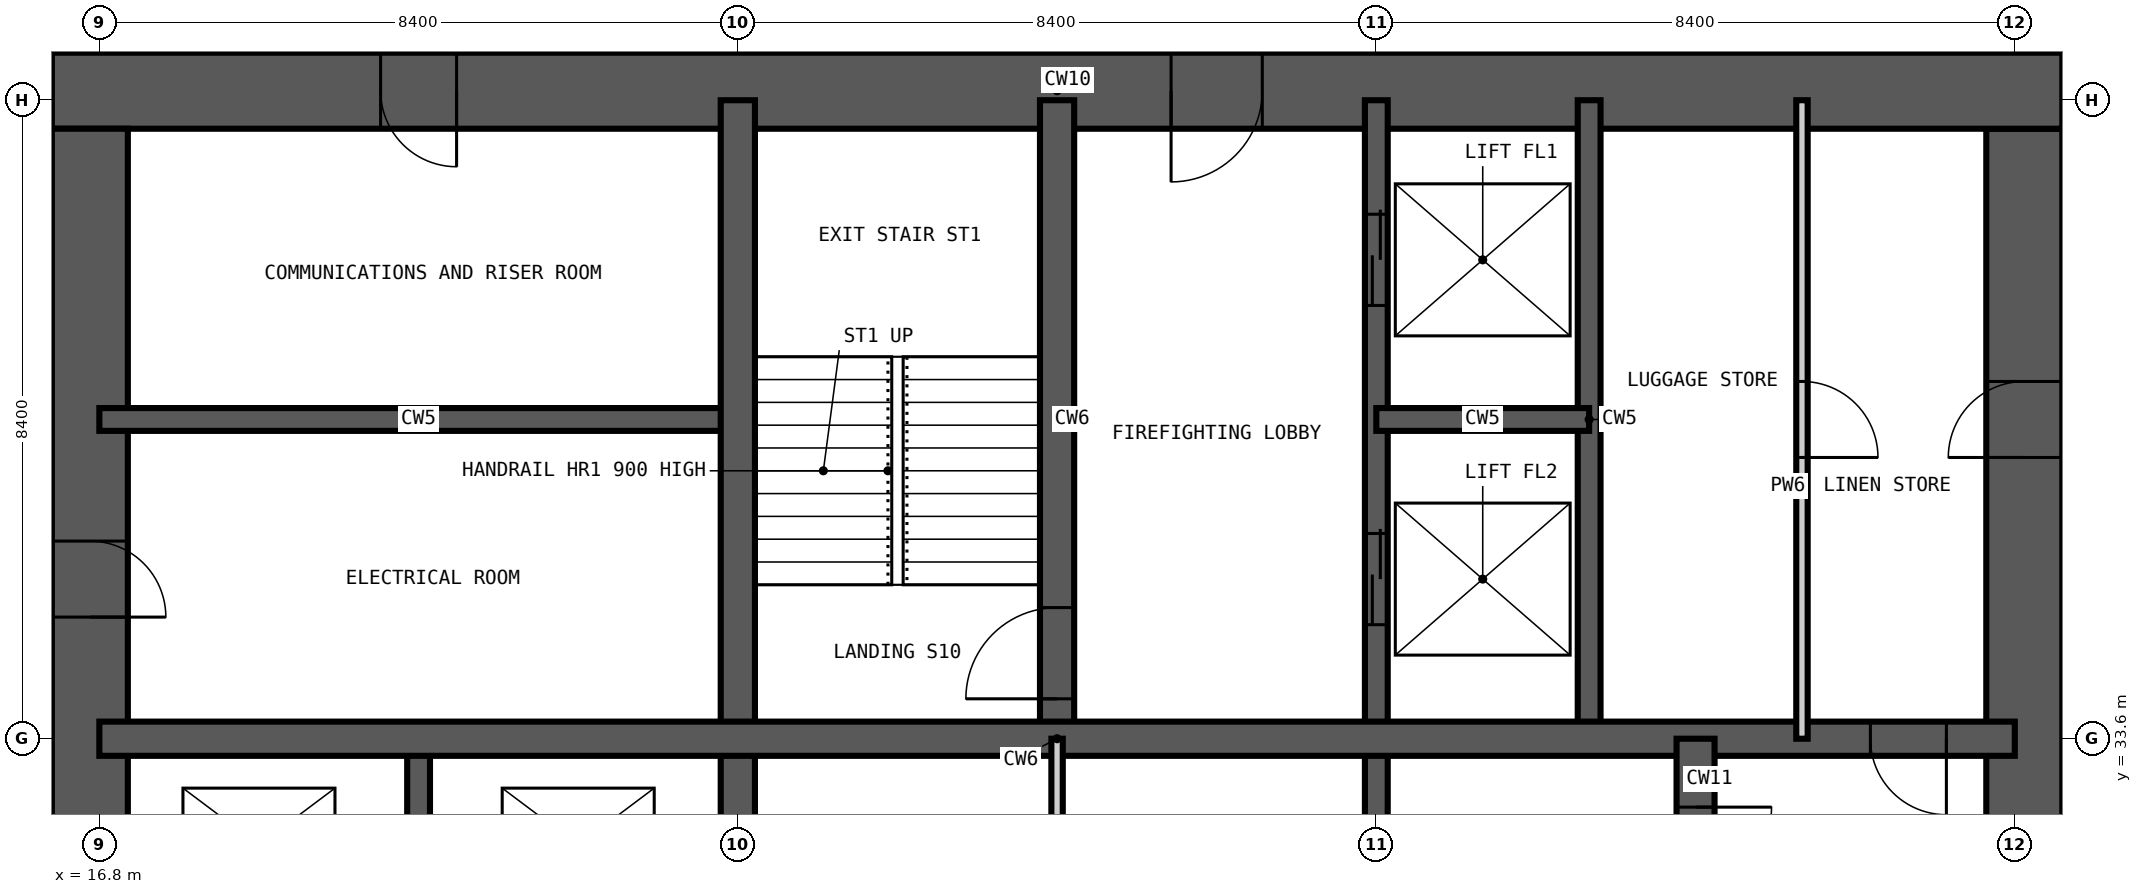
"""IFC4 building model, lengths in metres.
Left out: names, types, materials, properties, quantities, classifications, styles, units other than length and angle.
Written with IfcOpenShell. Run it as: python <this file> out.ifc"""

import sys

from ifc_helpers import new_model, si_unit, direction, frame, frame_2d, origin, place, context, subcontext, project, spatial, rectangle, extrude, element, fill, save


model = new_model("IFC4")
c1 = context("Model", 3, precision=1e-05, world=origin(), true_north=direction((0.0, 1.0)))
c2 = subcontext(c1, "Body", "Model", "MODEL_VIEW")
j1 = project(units=[si_unit("LENGTHUNIT", "METRE"), si_unit("PLANEANGLEUNIT", "RADIAN")], contexts=[c1])
p1 = place(None, origin())
s1 = spatial("IfcSite", under=j1, at=p1, CompositionType="ELEMENT")
p2 = place(p1, origin())
s2 = spatial("IfcBuilding", under=s1, at=p2, CompositionType="ELEMENT")
p3 = place(p2, frame((0.0, 0.0, 122.4)))
s3 = spatial("IfcBuildingStorey", under=s2, at=p3, CompositionType="ELEMENT", Elevation=122.4)
p4 = place(p3, frame((42.125, 17.175, -0.35), z_axis=(0.0, 0.0, 1.0), x_axis=(0.0, 1.0, 0.0)))
e1 = element("IfcWall", 1, at=p4, inside=s3, PredefinedType="SHEAR", context=c2, shape_type="SweptSolid", body=[
    extrude(rectangle(XDim=24.45, YDim=1.0, at=frame_2d((12.225, 0.0))), origin(), (0.0, 0.0, 1.0), 3.6),
])
p5 = place(p4, frame((0.425, 0.0, 0.35)))
e2 = element("IfcOpeningElement", 2, at=p5, cuts=e1, PredefinedType="OPENING", context=c2, shape_type="SweptSolid", body=[
    extrude(rectangle(XDim=1.2, YDim=2.2, at=frame_2d((0.6, 1.1))), frame((0.0, 0.51, 0.0), z_axis=(0.0, -1.0, 0.0), x_axis=(1.0, 0.0, 0.0)), (0.0, 0.0, 1.0), 1.02),
])
p6 = place(p4, frame((11.325, 0.0, 0.35)))
e3 = element("IfcOpeningElement", 3, at=p6, cuts=e1, PredefinedType="OPENING", context=c2, shape_type="SweptSolid", body=[
    extrude(rectangle(XDim=1.8, YDim=2.2, at=frame_2d((0.9, 1.1))), frame((0.0, 0.51, 0.0), z_axis=(0.0, -1.0, 0.0), x_axis=(1.0, 0.0, 0.0)), (0.0, 0.0, 1.0), 1.02),
])
p7 = place(p4, frame((20.125, 0.0, 0.35)))
e4 = element("IfcOpeningElement", 4, at=p7, cuts=e1, PredefinedType="OPENING", context=c2, shape_type="SweptSolid", body=[
    extrude(rectangle(XDim=1.0, YDim=2.1, at=frame_2d((0.5, 1.05))), frame((0.0, 0.51, 0.0), z_axis=(0.0, -1.0, 0.0), x_axis=(1.0, 0.0, 0.0)), (0.0, 0.0, 1.0), 1.02),
])
p8 = place(p3, frame((42.625, 42.125, -0.35), z_axis=(0.0, 0.0, 1.0), x_axis=(-1.0, 0.0, 0.0)))
e5 = element("IfcWall", 5, at=p8, inside=s3, PredefinedType="SHEAR", context=c2, shape_type="SweptSolid", body=[
    extrude(rectangle(XDim=26.45, YDim=1.0, at=frame_2d((13.225, 0.0))), origin(), (0.0, 0.0, 1.0), 3.6),
])
p9 = place(p8, frame((21.125, 0.0, 0.35)))
e6 = element("IfcOpeningElement", 6, at=p9, cuts=e5, PredefinedType="OPENING", context=c2, shape_type="SweptSolid", body=[
    extrude(rectangle(XDim=1.0, YDim=2.1, at=frame_2d((0.5, 1.05))), frame((0.0, 0.51, 0.0), z_axis=(0.0, -1.0, 0.0), x_axis=(1.0, 0.0, 0.0)), (0.0, 0.0, 1.0), 1.02),
])
p10 = place(p8, frame((10.525, 0.0, 0.35)))
e7 = element("IfcOpeningElement", 7, at=p10, cuts=e5, PredefinedType="OPENING", context=c2, shape_type="SweptSolid", body=[
    extrude(rectangle(XDim=1.2, YDim=2.2, at=frame_2d((0.6, 1.1))), frame((0.0, 0.51, 0.0), z_axis=(0.0, -1.0, 0.0), x_axis=(1.0, 0.0, 0.0)), (0.0, 0.0, 1.0), 1.02),
])
p11 = place(p3, frame((16.675, 41.625, -0.35), z_axis=(0.0, 0.0, 1.0), x_axis=(0.0, -1.0, 0.0)))
e8 = element("IfcWall", 8, at=p11, inside=s3, PredefinedType="SHEAR", context=c2, shape_type="SweptSolid", body=[
    extrude(rectangle(XDim=24.45, YDim=1.0, at=frame_2d((12.225, 0.0))), origin(), (0.0, 0.0, 1.0), 3.6),
])
p12 = place(p11, frame((11.325, 0.0, 0.35)))
e9 = element("IfcOpeningElement", 9, at=p12, cuts=e8, PredefinedType="OPENING", context=c2, shape_type="SweptSolid", body=[
    extrude(rectangle(XDim=1.8, YDim=2.2, at=frame_2d((0.9, 1.1))), frame((0.0, 0.51, 0.0), z_axis=(0.0, -1.0, 0.0), x_axis=(1.0, 0.0, 0.0)), (0.0, 0.0, 1.0), 1.02),
])
p13 = place(p11, frame((20.125, 0.0, 0.35)))
e10 = element("IfcOpeningElement", 10, at=p13, cuts=e8, PredefinedType="OPENING", context=c2, shape_type="SweptSolid", body=[
    extrude(rectangle(XDim=1.0, YDim=2.1, at=frame_2d((0.5, 1.05))), frame((0.0, 0.51, 0.0), z_axis=(0.0, -1.0, 0.0), x_axis=(1.0, 0.0, 0.0)), (0.0, 0.0, 1.0), 1.02),
])
p14 = place(p11, frame((5.425, 0.0, 0.35)))
e11 = element("IfcOpeningElement", 11, at=p14, cuts=e8, PredefinedType="OPENING", context=c2, shape_type="SweptSolid", body=[
    extrude(rectangle(XDim=1.0, YDim=2.1, at=frame_2d((0.5, 1.05))), frame((0.0, 0.51, 0.0), z_axis=(0.0, -1.0, 0.0), x_axis=(1.0, 0.0, 0.0)), (0.0, 0.0, 1.0), 1.02),
])
p15 = place(p3, frame((21.0, 30.8, -0.35), z_axis=(0.0, 0.0, 1.0), x_axis=(0.0, 1.0, 0.0)))
e12 = element("IfcWall", 12, at=p15, inside=s3, PredefinedType="SHEAR", context=c2, shape_type="SweptSolid", body=[
    extrude(rectangle(XDim=2.8, YDim=0.3, at=frame_2d((1.4, 0.0))), origin(), (0.0, 0.0, 1.0), 3.6),
])
p16 = place(p3, frame((33.6, 16.8, -0.35), z_axis=(0.0, 0.0, 1.0), x_axis=(0.0, 1.0, 0.0)))
e13 = element("IfcWall", 13, at=p16, inside=s3, PredefinedType="SHEAR", context=c2, shape_type="SweptSolid", body=[
    extrude(rectangle(XDim=25.2, YDim=0.3, at=frame_2d((12.6, 0.0))), origin(), (0.0, 0.0, 1.0), 3.6),
])
p17 = place(p16, frame((22.5, 0.0, 0.35)))
e14 = element("IfcOpeningElement", 14, at=p17, cuts=e13, PredefinedType="OPENING", context=c2, shape_type="SweptSolid", body=[
    extrude(rectangle(XDim=1.2, YDim=2.2, at=frame_2d((0.6, 1.1))), frame((0.0, 0.16, 0.0), z_axis=(0.0, -1.0, 0.0), x_axis=(1.0, 0.0, 0.0)), (0.0, 0.0, 1.0), 0.32),
])
p18 = place(p16, frame((18.3, 0.0, 0.35)))
e15 = element("IfcOpeningElement", 15, at=p18, cuts=e13, PredefinedType="OPENING", context=c2, shape_type="SweptSolid", body=[
    extrude(rectangle(XDim=1.2, YDim=2.2, at=frame_2d((0.6, 1.1))), frame((0.0, 0.16, 0.0), z_axis=(0.0, -1.0, 0.0), x_axis=(1.0, 0.0, 0.0)), (0.0, 0.0, 1.0), 0.32),
])
for number, where, z_axis, x_axis in (
    (16, (36.4, 33.6, -0.35), (0.0, 0.0, 1.0), (0.0, 1.0, 0.0)),
    (17, (16.8, 37.8, -0.35), (0.0, 0.0, 1.0), (1.0, 0.0, 0.0)),
):
    element("IfcWall", number, at=place(p3, frame(where, z_axis=z_axis, x_axis=x_axis)), inside=s3, PredefinedType="SHEAR", context=c2, shape_type="SweptSolid", body=[
        extrude(rectangle(XDim=8.4, YDim=0.3, at=frame_2d((4.2, 0.0))), origin(), (0.0, 0.0, 1.0), 3.6),
    ])
p19 = place(p3, frame((33.6, 37.8, -0.35), z_axis=(0.0, 0.0, 1.0), x_axis=(1.0, 0.0, 0.0)))
e18 = element("IfcWall", 18, at=p19, inside=s3, PredefinedType="SHEAR", context=c2, shape_type="SweptSolid", body=[
    extrude(rectangle(XDim=2.8, YDim=0.3, at=frame_2d((1.4, 0.0))), origin(), (0.0, 0.0, 1.0), 3.6),
])
p20 = place(p3, frame((25.2, 16.8, -0.35), z_axis=(0.0, 0.0, 1.0), x_axis=(0.0, 1.0, 0.0)))
e19 = element("IfcWall", 19, at=p20, inside=s3, PredefinedType="SHEAR", context=c2, shape_type="SweptSolid", body=[
    extrude(rectangle(XDim=25.2, YDim=0.45, at=frame_2d((12.6, 0.0))), origin(), (0.0, 0.0, 1.0), 3.6),
])
p21 = place(p20, frame((12.1, 0.0, 0.35)))
e20 = element("IfcOpeningElement", 20, at=p21, cuts=e19, PredefinedType="OPENING", context=c2, shape_type="SweptSolid", body=[
    extrude(rectangle(XDim=1.0, YDim=2.1, at=frame_2d((0.5, 1.05))), frame((0.0, 0.235, 0.0), z_axis=(0.0, -1.0, 0.0), x_axis=(1.0, 0.0, 0.0)), (0.0, 0.0, 1.0), 0.47),
])
p22 = place(p3, frame((29.4, 33.6, -0.35), z_axis=(0.0, 0.0, 1.0), x_axis=(0.0, 1.0, 0.0)))
e21 = element("IfcWall", 21, at=p22, inside=s3, PredefinedType="SHEAR", context=c2, shape_type="SweptSolid", body=[
    extrude(rectangle(XDim=8.4, YDim=0.45, at=frame_2d((4.2, 0.0))), origin(), (0.0, 0.0, 1.0), 3.6),
])
p23 = place(p22, frame((0.525, 0.0, 0.35)))
e22 = element("IfcOpeningElement", 22, at=p23, cuts=e21, PredefinedType="OPENING", context=c2, shape_type="SweptSolid", body=[
    extrude(rectangle(XDim=1.2, YDim=2.2, at=frame_2d((0.6, 1.1))), frame((0.0, 0.235, 0.0), z_axis=(0.0, -1.0, 0.0), x_axis=(1.0, 0.0, 0.0)), (0.0, 0.0, 1.0), 0.47),
])
p24 = place(p3, frame((16.8, 33.6, -0.35), z_axis=(0.0, 0.0, 1.0), x_axis=(1.0, 0.0, 0.0)))
e23 = element("IfcWall", 23, at=p24, inside=s3, PredefinedType="SHEAR", context=c2, shape_type="SweptSolid", body=[
    extrude(rectangle(XDim=25.2, YDim=0.45, at=frame_2d((12.6, 0.0))), origin(), (0.0, 0.0, 1.0), 3.6),
])
p25 = place(p24, frame((23.3, 0.0, 0.35)))
e24 = element("IfcOpeningElement", 24, at=p25, cuts=e23, PredefinedType="OPENING", context=c2, shape_type="SweptSolid", body=[
    extrude(rectangle(XDim=1.0, YDim=2.1, at=frame_2d((0.5, 1.05))), frame((0.0, 0.235, 0.0), z_axis=(0.0, -1.0, 0.0), x_axis=(1.0, 0.0, 0.0)), (0.0, 0.0, 1.0), 0.47),
])
p26 = place(p3, frame((37.8, 30.8, -0.35), z_axis=(0.0, 0.0, 1.0), x_axis=(0.0, 1.0, 0.0)))
e25 = element("IfcWall", 25, at=p26, inside=s3, PredefinedType="SHEAR", context=c2, shape_type="SweptSolid", body=[
    extrude(rectangle(XDim=2.8, YDim=0.5, at=frame_2d((1.4, 0.0))), origin(), (0.0, 0.0, 1.0), 3.6),
])
p27 = place(p26, frame((0.9, 0.0, 0.35)))
e26 = element("IfcOpeningElement", 26, at=p27, cuts=e25, PredefinedType="OPENING", context=c2, shape_type="SweptSolid", body=[
    extrude(rectangle(XDim=1.0, YDim=2.1, at=frame_2d((0.5, 1.05))), frame((0.0, 0.26, 0.0), z_axis=(0.0, -1.0, 0.0), x_axis=(1.0, 0.0, 0.0)), (0.0, 0.0, 1.0), 0.52),
])
p28 = place(p3, frame((29.4, 25.2, 0.0), z_axis=(0.0, 0.0, 1.0), x_axis=(0.0, 1.0, 0.0)))
e27 = element("IfcWall", 27, at=p28, inside=s3, PredefinedType="PARTITIONING", context=c2, shape_type="SweptSolid", body=[
    extrude(rectangle(XDim=8.4, YDim=0.15, at=frame_2d((4.2, 0.0))), origin(), (0.0, 0.0, 1.0), 3.25),
])
p29 = place(p28, frame((3.7, 0.0, 0.0)))
e28 = element("IfcOpeningElement", 28, at=p29, cuts=e27, PredefinedType="OPENING", context=c2, shape_type="SweptSolid", body=[
    extrude(rectangle(XDim=1.0, YDim=2.1, at=frame_2d((0.5, 1.05))), frame((0.0, 0.085, 0.0), z_axis=(0.0, -1.0, 0.0), x_axis=(1.0, 0.0, 0.0)), (0.0, 0.0, 1.0), 0.17),
])
p30 = place(p3, frame((39.2, 33.6, 0.0), z_axis=(0.0, 0.0, 1.0), x_axis=(0.0, 1.0, 0.0)))
e29 = element("IfcWall", 29, at=p30, inside=s3, PredefinedType="PARTITIONING", context=c2, shape_type="SweptSolid", body=[
    extrude(rectangle(XDim=8.4, YDim=0.15, at=frame_2d((4.2, 0.0))), origin(), (0.0, 0.0, 1.0), 3.25),
])
p31 = place(p30, frame((3.7, 0.0, 0.0)))
e30 = element("IfcOpeningElement", 30, at=p31, cuts=e29, PredefinedType="OPENING", context=c2, shape_type="SweptSolid", body=[
    extrude(rectangle(XDim=1.0, YDim=2.1, at=frame_2d((0.5, 1.05))), frame((0.0, 0.085, 0.0), z_axis=(0.0, -1.0, 0.0), x_axis=(1.0, 0.0, 0.0)), (0.0, 0.0, 1.0), 0.17),
])
p32 = place(p23, origin())
e31 = element("IfcDoor", 31, at=p32, inside=s3, OperationType="SINGLE_SWING_LEFT", PredefinedType="DOOR", context=c2, shape_type="SweptSolid", body=[
    extrude(rectangle(XDim=1.2, YDim=2.2, at=frame_2d((0.6, 1.1))), frame((0.0, 0.025, 0.0), z_axis=(0.0, -1.0, 0.0), x_axis=(1.0, 0.0, 0.0)), (0.0, 0.0, 1.0), 0.05),
])
fill(e22, e31)
p33 = place(p17, origin())
e32 = element("IfcDoor", 32, at=p33, inside=s3, OperationType="DOUBLE_DOOR_SLIDING", PredefinedType="DOOR", context=c2, shape_type="SweptSolid", body=[
    extrude(rectangle(XDim=1.2, YDim=2.2, at=frame_2d((0.6, 1.1))), frame((0.0, 0.025, 0.0), z_axis=(0.0, -1.0, 0.0), x_axis=(1.0, 0.0, 0.0)), (0.0, 0.0, 1.0), 0.05),
])
fill(e14, e32)
p34 = place(p18, origin())
e33 = element("IfcDoor", 33, at=p34, inside=s3, OperationType="DOUBLE_DOOR_SLIDING", PredefinedType="DOOR", context=c2, shape_type="SweptSolid", body=[
    extrude(rectangle(XDim=1.2, YDim=2.2, at=frame_2d((0.6, 1.1))), frame((0.0, 0.025, 0.0), z_axis=(0.0, -1.0, 0.0), x_axis=(1.0, 0.0, 0.0)), (0.0, 0.0, 1.0), 0.05),
])
fill(e15, e33)
p35 = place(p14, origin())
e34 = element("IfcDoor", 34, at=p35, inside=s3, OperationType="SINGLE_SWING_RIGHT", PredefinedType="DOOR", context=c2, shape_type="SweptSolid", body=[
    extrude(rectangle(XDim=1.0, YDim=2.1, at=frame_2d((0.5, 1.05))), frame((0.0, 0.025, 0.0), z_axis=(0.0, -1.0, 0.0), x_axis=(1.0, 0.0, 0.0)), (0.0, 0.0, 1.0), 0.05),
])
fill(e11, e34)
p36 = place(p9, origin())
e35 = element("IfcDoor", 35, at=p36, inside=s3, OperationType="SINGLE_SWING_LEFT", PredefinedType="DOOR", context=c2, shape_type="SweptSolid", body=[
    extrude(rectangle(XDim=1.0, YDim=2.1, at=frame_2d((0.5, 1.05))), frame((0.0, 0.025, 0.0), z_axis=(0.0, -1.0, 0.0), x_axis=(1.0, 0.0, 0.0)), (0.0, 0.0, 1.0), 0.05),
])
fill(e6, e35)
p37 = place(p27, frame((1.0, 0.0, 0.0), z_axis=(0.0, 0.0, 1.0), x_axis=(-1.0, 0.0, 0.0)))
e36 = element("IfcDoor", 36, at=p37, inside=s3, OperationType="SINGLE_SWING_LEFT", PredefinedType="DOOR", context=c2, shape_type="SweptSolid", body=[
    extrude(rectangle(XDim=1.0, YDim=2.1, at=frame_2d((0.5, 1.05))), frame((0.0, 0.025, 0.0), z_axis=(0.0, -1.0, 0.0), x_axis=(1.0, 0.0, 0.0)), (0.0, 0.0, 1.0), 0.05),
])
fill(e26, e36)
p38 = place(p25, frame((1.0, 0.0, 0.0), z_axis=(0.0, 0.0, 1.0), x_axis=(-1.0, 0.0, 0.0)))
e37 = element("IfcDoor", 37, at=p38, inside=s3, OperationType="SINGLE_SWING_LEFT", PredefinedType="DOOR", context=c2, shape_type="SweptSolid", body=[
    extrude(rectangle(XDim=1.0, YDim=2.1, at=frame_2d((0.5, 1.05))), frame((0.0, 0.025, 0.0), z_axis=(0.0, -1.0, 0.0), x_axis=(1.0, 0.0, 0.0)), (0.0, 0.0, 1.0), 0.05),
])
fill(e24, e37)
p39 = place(p10, origin())
e38 = element("IfcDoor", 38, at=p39, inside=s3, OperationType="SINGLE_SWING_RIGHT", PredefinedType="DOOR", context=c2, shape_type="SweptSolid", body=[
    extrude(rectangle(XDim=1.2, YDim=2.2, at=frame_2d((0.6, 1.1))), frame((0.0, 0.025, 0.0), z_axis=(0.0, -1.0, 0.0), x_axis=(1.0, 0.0, 0.0)), (0.0, 0.0, 1.0), 0.05),
])
fill(e7, e38)
p40 = place(p7, origin())
e39 = element("IfcDoor", 39, at=p40, inside=s3, OperationType="SINGLE_SWING_LEFT", PredefinedType="DOOR", context=c2, shape_type="SweptSolid", body=[
    extrude(rectangle(XDim=1.0, YDim=2.1, at=frame_2d((0.5, 1.05))), frame((0.0, 0.025, 0.0), z_axis=(0.0, -1.0, 0.0), x_axis=(1.0, 0.0, 0.0)), (0.0, 0.0, 1.0), 0.05),
])
fill(e4, e39)
p41 = place(p31, frame((1.0, 0.0, 0.0), z_axis=(0.0, 0.0, 1.0), x_axis=(-1.0, 0.0, 0.0)))
e40 = element("IfcDoor", 40, at=p41, inside=s3, OperationType="SINGLE_SWING_RIGHT", PredefinedType="DOOR", context=c2, shape_type="SweptSolid", body=[
    extrude(rectangle(XDim=1.0, YDim=2.1, at=frame_2d((0.5, 1.05))), frame((0.0, 0.025, 0.0), z_axis=(0.0, -1.0, 0.0), x_axis=(1.0, 0.0, 0.0)), (0.0, 0.0, 1.0), 0.05),
])
fill(e30, e40)
save(model, sys.argv[1])
